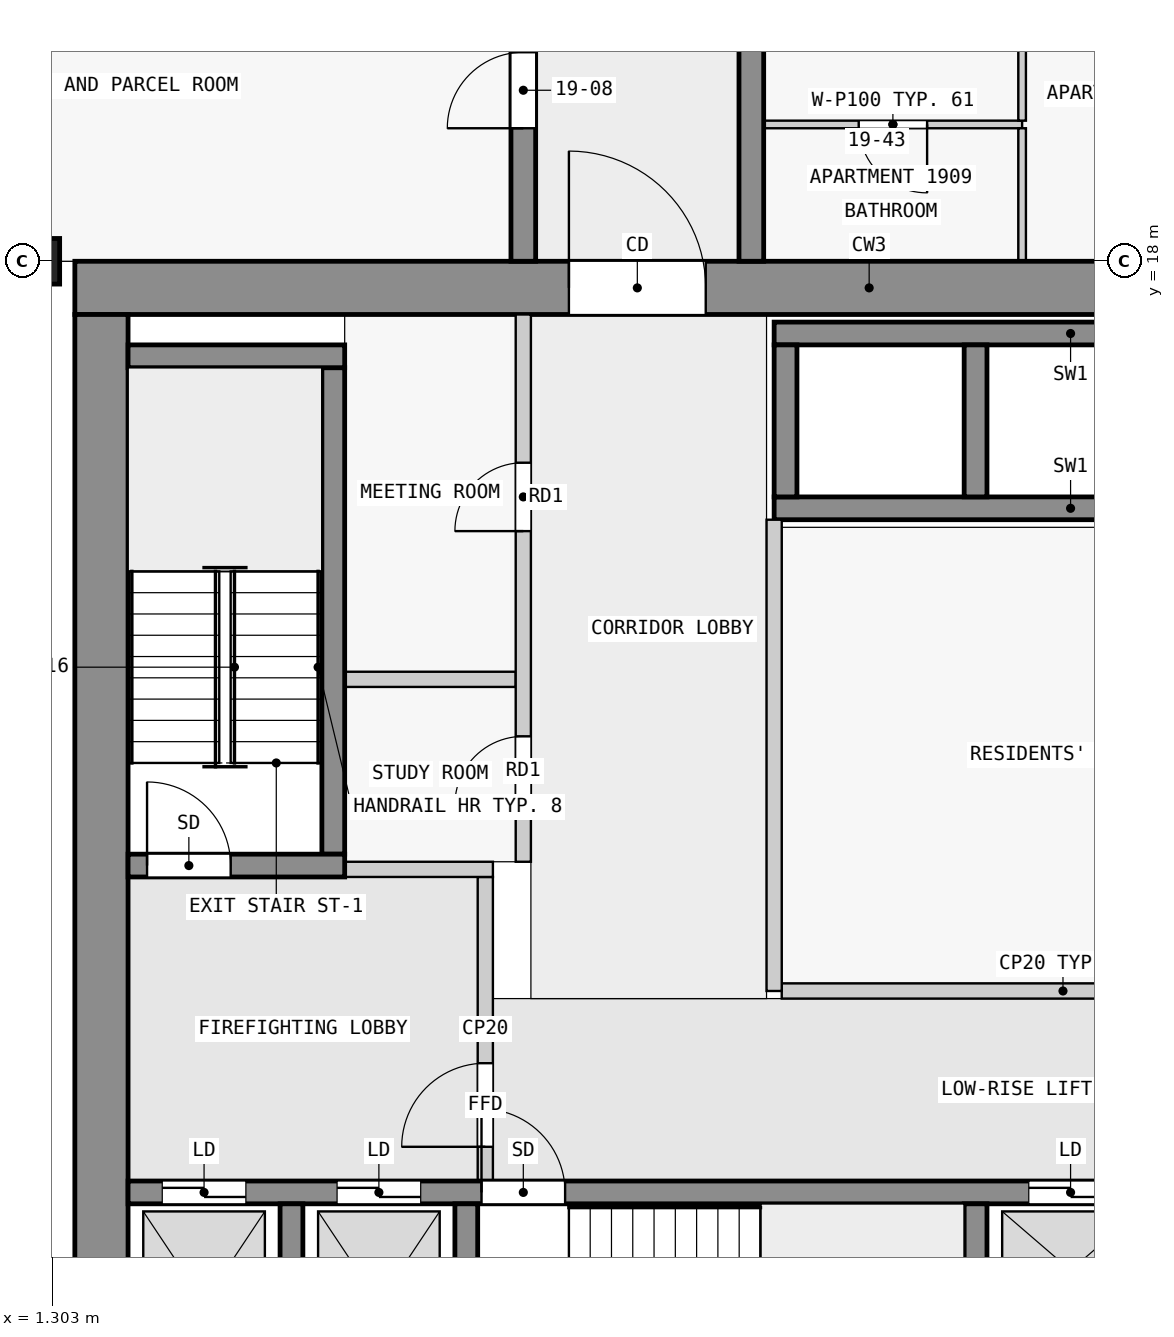
"""IFC4 building model, lengths in metres.
Left out: names, types, materials, properties, quantities, classifications, styles, units other than length and angle.
Written with IfcOpenShell. Run it as: python <this file> out.ifc"""

import sys

from ifc_helpers import new_model, si_unit, direction, frame, frame_2d, origin, origin_2d, place, context, subcontext, project, spatial, rectangle, extrude, element, fill, save


model = new_model("IFC4")
c1 = context("Model", 3, precision=1e-05, world=origin(), true_north=direction((0.0, 1.0)))
c2 = subcontext(c1, "Body", "Model", "MODEL_VIEW")
j1 = project(units=[si_unit("LENGTHUNIT", "METRE"), si_unit("PLANEANGLEUNIT", "RADIAN")], contexts=[c1])
p1 = place(None, origin())
s1 = spatial("IfcSite", under=j1, at=p1, CompositionType="ELEMENT")
p2 = place(p1, origin())
s2 = spatial("IfcBuilding", under=s1, at=p2, CompositionType="ELEMENT")
p3 = place(p2, frame((0.0, 0.0, 78.3)))
s3 = spatial("IfcBuildingStorey", under=s2, at=p3, CompositionType="ELEMENT", Elevation=78.3)
p4 = place(p3, frame((0.7, 18.0, 0.0), z_axis=(0.0, 0.0, 1.0), x_axis=(0.0, 1.0, 0.0)))
e1 = element("IfcColumn", 1, at=p4, inside=s3, PredefinedType="COLUMN", context=c2, shape_type="SweptSolid", body=[
    extrude(rectangle(XDim=0.6, YDim=1.4, at=origin_2d()), origin(), (0.0, 0.0, 1.0), 3.5),
])
p5 = place(p3, frame((1.6, 17.65, 0.0), z_axis=(0.0, 0.0, 1.0), x_axis=(1.0, 0.0, 0.0)))
e2 = element("IfcWall", 2, at=p5, inside=s3, PredefinedType="SHEAR", context=c2, shape_type="SweptSolid", body=[
    extrude(rectangle(XDim=20.9, YDim=0.7, at=frame_2d((10.45, 0.0))), origin(), (0.0, 0.0, 1.0), 3.25),
])
p6 = place(p5, frame((6.5, 0.0, 0.0)))
e3 = element("IfcOpeningElement", 3, at=p6, cuts=e2, PredefinedType="OPENING", context=c2, shape_type="SweptSolid", body=[
    extrude(rectangle(XDim=1.8, YDim=2.1, at=frame_2d((0.9, 1.05))), frame((0.0, 0.36, 0.0), z_axis=(0.0, -1.0, 0.0), x_axis=(1.0, 0.0, 0.0)), (0.0, 0.0, 1.0), 0.72),
])
p7 = place(p3, frame((1.95, 2.5, 0.0), z_axis=(0.0, 0.0, 1.0), x_axis=(0.0, 1.0, 0.0)))
e4 = element("IfcWall", 4, at=p7, inside=s3, PredefinedType="SHEAR", context=c2, shape_type="SweptSolid", body=[
    extrude(rectangle(XDim=14.8, YDim=0.7, at=frame_2d((7.4, 0.0))), origin(), (0.0, 0.0, 1.0), 3.25),
])
for number, where, z_axis, x_axis in (
    (5, (4.45, 2.8, 0.0), (0.0, 0.0, 1.0), (0.0, 1.0, 0.0)),
    (6, (6.75, 2.8, 0.0), (0.0, 0.0, 1.0), (0.0, 1.0, 0.0)),
    (7, (13.45, 2.8, 0.0), (0.0, 0.0, 1.0), (0.0, 1.0, 0.0)),
):
    element("IfcWall", number, at=place(p3, frame(where, z_axis=z_axis, x_axis=x_axis)), inside=s3, PredefinedType="SHEAR", context=c2, shape_type="SweptSolid", body=[
        extrude(rectangle(XDim=2.8, YDim=0.3, at=frame_2d((1.4, 0.0))), origin(), (0.0, 0.0, 1.0), 3.25),
    ])
p8 = place(p3, frame((2.3, 5.75, 0.0), z_axis=(0.0, 0.0, 1.0), x_axis=(1.0, 0.0, 0.0)))
e8 = element("IfcWall", 8, at=p8, inside=s3, PredefinedType="SHEAR", context=c2, shape_type="SweptSolid", body=[
    extrude(rectangle(XDim=18.8, YDim=0.3, at=frame_2d((9.4, 0.0))), origin(), (0.0, 0.0, 1.0), 3.25),
])
p9 = place(p8, frame((4.65, 0.0, 0.0)))
e9 = element("IfcOpeningElement", 9, at=p9, cuts=e8, PredefinedType="OPENING", context=c2, shape_type="SweptSolid", body=[
    extrude(rectangle(XDim=1.1, YDim=2.1, at=frame_2d((0.55, 1.05))), frame((0.0, 0.16, 0.0), z_axis=(0.0, -1.0, 0.0), x_axis=(1.0, 0.0, 0.0)), (0.0, 0.0, 1.0), 0.32),
])
p10 = place(p8, frame((0.45, 0.0, 0.0)))
e10 = element("IfcOpeningElement", 10, at=p10, cuts=e8, PredefinedType="OPENING", context=c2, shape_type="SweptSolid", body=[
    extrude(rectangle(XDim=1.1, YDim=2.1, at=frame_2d((0.55, 1.05))), frame((0.0, 0.16, 0.0), z_axis=(0.0, -1.0, 0.0), x_axis=(1.0, 0.0, 0.0)), (0.0, 0.0, 1.0), 0.32),
])
p11 = place(p8, frame((2.75, 0.0, 0.0)))
e11 = element("IfcOpeningElement", 11, at=p11, cuts=e8, PredefinedType="OPENING", context=c2, shape_type="SweptSolid", body=[
    extrude(rectangle(XDim=1.1, YDim=2.1, at=frame_2d((0.55, 1.05))), frame((0.0, 0.16, 0.0), z_axis=(0.0, -1.0, 0.0), x_axis=(1.0, 0.0, 0.0)), (0.0, 0.0, 1.0), 0.32),
])
p12 = place(p8, frame((11.85, 0.0, 0.0)))
e12 = element("IfcOpeningElement", 12, at=p12, cuts=e8, PredefinedType="OPENING", context=c2, shape_type="SweptSolid", body=[
    extrude(rectangle(XDim=1.1, YDim=2.1, at=frame_2d((0.55, 1.05))), frame((0.0, 0.16, 0.0), z_axis=(0.0, -1.0, 0.0), x_axis=(1.0, 0.0, 0.0)), (0.0, 0.0, 1.0), 0.32),
])
p13 = place(p8, frame((14.35, 0.0, 0.0)))
e13 = element("IfcOpeningElement", 13, at=p13, cuts=e8, PredefinedType="OPENING", context=c2, shape_type="SweptSolid", body=[
    extrude(rectangle(XDim=1.1, YDim=2.1, at=frame_2d((0.55, 1.05))), frame((0.0, 0.16, 0.0), z_axis=(0.0, -1.0, 0.0), x_axis=(1.0, 0.0, 0.0)), (0.0, 0.0, 1.0), 0.32),
])
p14 = place(p8, frame((16.85, 0.0, 0.0)))
e14 = element("IfcOpeningElement", 14, at=p14, cuts=e8, PredefinedType="OPENING", context=c2, shape_type="SweptSolid", body=[
    extrude(rectangle(XDim=1.1, YDim=2.1, at=frame_2d((0.55, 1.05))), frame((0.0, 0.16, 0.0), z_axis=(0.0, -1.0, 0.0), x_axis=(1.0, 0.0, 0.0)), (0.0, 0.0, 1.0), 0.32),
])
p15 = place(p3, frame((2.3, 10.05, 0.0), z_axis=(0.0, 0.0, 1.0), x_axis=(1.0, 0.0, 0.0)))
e15 = element("IfcWall", 15, at=p15, inside=s3, PredefinedType="SHEAR", context=c2, shape_type="SweptSolid", body=[
    extrude(rectangle(XDim=2.85, YDim=0.3, at=frame_2d((1.425, 0.0))), origin(), (0.0, 0.0, 1.0), 3.25),
])
p16 = place(p15, frame((0.25, 0.0, 0.0)))
e16 = element("IfcOpeningElement", 16, at=p16, cuts=e15, PredefinedType="OPENING", context=c2, shape_type="SweptSolid", body=[
    extrude(rectangle(XDim=1.1, YDim=2.1, at=frame_2d((0.55, 1.05))), frame((0.0, 0.16, 0.0), z_axis=(0.0, -1.0, 0.0), x_axis=(1.0, 0.0, 0.0)), (0.0, 0.0, 1.0), 0.32),
])
p17 = place(p3, frame((5.0, 10.2, 0.0), z_axis=(0.0, 0.0, 1.0), x_axis=(0.0, 1.0, 0.0)))
e17 = element("IfcWall", 17, at=p17, inside=s3, PredefinedType="SHEAR", context=c2, shape_type="SweptSolid", body=[
    extrude(rectangle(XDim=6.4, YDim=0.3, at=frame_2d((3.2, 0.0))), origin(), (0.0, 0.0, 1.0), 3.25),
])
p18 = place(p3, frame((2.3, 16.75, 0.0), z_axis=(0.0, 0.0, 1.0), x_axis=(1.0, 0.0, 0.0)))
e18 = element("IfcWall", 18, at=p18, inside=s3, PredefinedType="SHEAR", context=c2, shape_type="SweptSolid", body=[
    extrude(rectangle(XDim=2.85, YDim=0.3, at=frame_2d((1.425, 0.0))), origin(), (0.0, 0.0, 1.0), 3.25),
])
for number, where, z_axis, x_axis in (
    (19, (10.8, 17.05, 0.0), (0.0, 0.0, 1.0), (1.0, 0.0, 0.0)),
    (20, (10.8, 14.75, 0.0), (0.0, 0.0, 1.0), (1.0, 0.0, 0.0)),
):
    element("IfcWall", number, at=place(p3, frame(where, z_axis=z_axis, x_axis=x_axis)), inside=s3, PredefinedType="SHEAR", context=c2, shape_type="SweptSolid", body=[
        extrude(rectangle(XDim=7.8, YDim=0.3, at=frame_2d((3.9, 0.0))), origin(), (0.0, 0.0, 1.0), 3.25),
    ])
for number, where, z_axis, x_axis in (
    (21, (10.95, 14.9, 0.0), (0.0, 0.0, 1.0), (0.0, 1.0, 0.0)),
    (22, (13.45, 14.9, 0.0), (0.0, 0.0, 1.0), (0.0, 1.0, 0.0)),
):
    element("IfcWall", number, at=place(p3, frame(where, z_axis=z_axis, x_axis=x_axis)), inside=s3, PredefinedType="SHEAR", context=c2, shape_type="SweptSolid", body=[
        extrude(rectangle(XDim=2.0, YDim=0.3, at=frame_2d((1.0, 0.0))), origin(), (0.0, 0.0, 1.0), 3.25),
    ])
p19 = place(p3, frame((7.5, 18.0, 0.0), z_axis=(0.0, 0.0, 1.0), x_axis=(0.0, 1.0, 0.0)))
e23 = element("IfcWall", 23, at=p19, inside=s3, PredefinedType="SHEAR", context=c2, shape_type="SweptSolid", body=[
    extrude(rectangle(XDim=27.0, YDim=0.325, at=frame_2d((13.5, 0.0))), origin(), (0.0, 0.0, 1.0), 3.25),
])
p20 = place(p19, frame((1.75, 0.0, 0.0)))
e24 = element("IfcOpeningElement", 24, at=p20, cuts=e23, PredefinedType="OPENING", context=c2, shape_type="SweptSolid", body=[
    extrude(rectangle(XDim=1.0, YDim=2.1, at=frame_2d((0.5, 1.05))), frame((0.0, 0.172, 0.0), z_axis=(0.0, -1.0, 0.0), x_axis=(1.0, 0.0, 0.0)), (0.0, 0.0, 1.0), 0.345),
])
p21 = place(p19, frame((6.25, 0.0, 0.0)))
e25 = element("IfcOpeningElement", 25, at=p21, cuts=e23, PredefinedType="OPENING", context=c2, shape_type="SweptSolid", body=[
    extrude(rectangle(XDim=1.0, YDim=2.1, at=frame_2d((0.5, 1.05))), frame((0.0, 0.172, 0.0), z_axis=(0.0, -1.0, 0.0), x_axis=(1.0, 0.0, 0.0)), (0.0, 0.0, 1.0), 0.345),
])
p22 = place(p19, frame((10.75, 0.0, 0.0)))
e26 = element("IfcOpeningElement", 26, at=p22, cuts=e23, PredefinedType="OPENING", context=c2, shape_type="SweptSolid", body=[
    extrude(rectangle(XDim=1.0, YDim=2.1, at=frame_2d((0.5, 1.05))), frame((0.0, 0.172, 0.0), z_axis=(0.0, -1.0, 0.0), x_axis=(1.0, 0.0, 0.0)), (0.0, 0.0, 1.0), 0.345),
])
p23 = place(p19, frame((15.25, 0.0, 0.0)))
e27 = element("IfcOpeningElement", 27, at=p23, cuts=e23, PredefinedType="OPENING", context=c2, shape_type="SweptSolid", body=[
    extrude(rectangle(XDim=1.0, YDim=2.1, at=frame_2d((0.5, 1.05))), frame((0.0, 0.172, 0.0), z_axis=(0.0, -1.0, 0.0), x_axis=(1.0, 0.0, 0.0)), (0.0, 0.0, 1.0), 0.345),
])
p24 = place(p19, frame((21.35, 0.0, 0.0)))
e28 = element("IfcOpeningElement", 28, at=p24, cuts=e23, PredefinedType="OPENING", context=c2, shape_type="SweptSolid", body=[
    extrude(rectangle(XDim=1.0, YDim=2.1, at=frame_2d((0.5, 1.05))), frame((0.0, 0.172, 0.0), z_axis=(0.0, -1.0, 0.0), x_axis=(1.0, 0.0, 0.0)), (0.0, 0.0, 1.0), 0.345),
])
p25 = place(p3, frame((10.5, 18.0, 0.0), z_axis=(0.0, 0.0, 1.0), x_axis=(0.0, 1.0, 0.0)))
e29 = element("IfcWall", 29, at=p25, inside=s3, PredefinedType="SHEAR", context=c2, shape_type="SweptSolid", body=[
    extrude(rectangle(XDim=27.0, YDim=0.325, at=frame_2d((13.5, 0.0))), origin(), (0.0, 0.0, 1.0), 3.25),
])
p26 = place(p25, frame((4.05, 0.0, 0.0)))
e30 = element("IfcOpeningElement", 30, at=p26, cuts=e29, PredefinedType="OPENING", context=c2, shape_type="SweptSolid", body=[
    extrude(rectangle(XDim=1.0, YDim=2.1, at=frame_2d((0.5, 1.05))), frame((0.0, 0.172, 0.0), z_axis=(0.0, -1.0, 0.0), x_axis=(1.0, 0.0, 0.0)), (0.0, 0.0, 1.0), 0.345),
])
p27 = place(p25, frame((13.05, 0.0, 0.0)))
e31 = element("IfcOpeningElement", 31, at=p27, cuts=e29, PredefinedType="OPENING", context=c2, shape_type="SweptSolid", body=[
    extrude(rectangle(XDim=1.0, YDim=2.1, at=frame_2d((0.5, 1.05))), frame((0.0, 0.172, 0.0), z_axis=(0.0, -1.0, 0.0), x_axis=(1.0, 0.0, 0.0)), (0.0, 0.0, 1.0), 0.345),
])
p28 = place(p25, frame((19.75, 0.0, 0.0)))
e32 = element("IfcOpeningElement", 32, at=p28, cuts=e29, PredefinedType="OPENING", context=c2, shape_type="SweptSolid", body=[
    extrude(rectangle(XDim=1.0, YDim=2.1, at=frame_2d((0.5, 1.05))), frame((0.0, 0.172, 0.0), z_axis=(0.0, -1.0, 0.0), x_axis=(1.0, 0.0, 0.0)), (0.0, 0.0, 1.0), 0.345),
])
p29 = place(p25, frame((23.25, 0.0, 0.0)))
e33 = element("IfcOpeningElement", 33, at=p29, cuts=e29, PredefinedType="OPENING", context=c2, shape_type="SweptSolid", body=[
    extrude(rectangle(XDim=0.9, YDim=2.1, at=frame_2d((0.45, 1.05))), frame((0.0, 0.172, 0.0), z_axis=(0.0, -1.0, 0.0), x_axis=(1.0, 0.0, 0.0)), (0.0, 0.0, 1.0), 0.345),
])
p30 = place(p25, frame((25.45, 0.0, 0.0)))
e34 = element("IfcOpeningElement", 34, at=p30, cuts=e29, PredefinedType="OPENING", context=c2, shape_type="SweptSolid", body=[
    extrude(rectangle(XDim=1.0, YDim=2.1, at=frame_2d((0.5, 1.05))), frame((0.0, 0.172, 0.0), z_axis=(0.0, -1.0, 0.0), x_axis=(1.0, 0.0, 0.0)), (0.0, 0.0, 1.0), 0.345),
])
p31 = place(p3, frame((7.0, 5.9, 0.0), z_axis=(0.0, 0.0, 1.0), x_axis=(0.0, 1.0, 0.0)))
e35 = element("IfcWall", 35, at=p31, inside=s3, PredefinedType="PARTITIONING", context=c2, shape_type="SweptSolid", body=[
    extrude(rectangle(XDim=4.0, YDim=0.2, at=frame_2d((2.0, 0.0))), origin(), (0.0, 0.0, 1.0), 3.25),
])
p32 = place(p31, frame((0.45, 0.0, 0.0)))
e36 = element("IfcOpeningElement", 36, at=p32, cuts=e35, PredefinedType="OPENING", context=c2, shape_type="SweptSolid", body=[
    extrude(rectangle(XDim=1.1, YDim=2.1, at=frame_2d((0.55, 1.05))), frame((0.0, 0.11, 0.0), z_axis=(0.0, -1.0, 0.0), x_axis=(1.0, 0.0, 0.0)), (0.0, 0.0, 1.0), 0.22),
])
p33 = place(p3, frame((5.15, 10.0, 0.0), z_axis=(0.0, 0.0, 1.0), x_axis=(1.0, 0.0, 0.0)))
e37 = element("IfcWall", 37, at=p33, inside=s3, PredefinedType="PARTITIONING", context=c2, shape_type="SweptSolid", body=[
    extrude(rectangle(XDim=1.95, YDim=0.2, at=frame_2d((0.975, 0.0))), origin(), (0.0, 0.0, 1.0), 3.25),
])
p34 = place(p3, frame((10.8, 8.4, 0.0), z_axis=(0.0, 0.0, 1.0), x_axis=(0.0, 1.0, 0.0)))
e38 = element("IfcWall", 38, at=p34, inside=s3, PredefinedType="PARTITIONING", context=c2, shape_type="SweptSolid", body=[
    extrude(rectangle(XDim=6.2, YDim=0.2, at=frame_2d((3.1, 0.0))), origin(), (0.0, 0.0, 1.0), 3.25),
])
p35 = place(p3, frame((10.9, 8.4, 0.0), z_axis=(0.0, 0.0, 1.0), x_axis=(1.0, 0.0, 0.0)))
e39 = element("IfcWall", 39, at=p35, inside=s3, PredefinedType="PARTITIONING", context=c2, shape_type="SweptSolid", body=[
    extrude(rectangle(XDim=7.4, YDim=0.2, at=frame_2d((3.7, 0.0))), origin(), (0.0, 0.0, 1.0), 3.25),
])
p36 = place(p3, frame((7.5, 10.1, 0.0), z_axis=(0.0, 0.0, 1.0), x_axis=(0.0, 1.0, 0.0)))
e40 = element("IfcWall", 40, at=p36, inside=s3, PredefinedType="PARTITIONING", context=c2, shape_type="SweptSolid", body=[
    extrude(rectangle(XDim=7.2, YDim=0.2, at=frame_2d((3.6, 0.0))), origin(), (0.0, 0.0, 1.0), 3.25),
])
p37 = place(p36, frame((0.75, 0.0, 0.0)))
e41 = element("IfcOpeningElement", 41, at=p37, cuts=e40, PredefinedType="OPENING", context=c2, shape_type="SweptSolid", body=[
    extrude(rectangle(XDim=0.9, YDim=2.1, at=frame_2d((0.45, 1.05))), frame((0.0, 0.11, 0.0), z_axis=(0.0, -1.0, 0.0), x_axis=(1.0, 0.0, 0.0)), (0.0, 0.0, 1.0), 0.22),
])
p38 = place(p36, frame((4.35, 0.0, 0.0)))
e42 = element("IfcOpeningElement", 42, at=p38, cuts=e40, PredefinedType="OPENING", context=c2, shape_type="SweptSolid", body=[
    extrude(rectangle(XDim=0.9, YDim=2.1, at=frame_2d((0.45, 1.05))), frame((0.0, 0.11, 0.0), z_axis=(0.0, -1.0, 0.0), x_axis=(1.0, 0.0, 0.0)), (0.0, 0.0, 1.0), 0.22),
])
p39 = place(p3, frame((5.15, 12.5, 0.0), z_axis=(0.0, 0.0, 1.0), x_axis=(1.0, 0.0, 0.0)))
e43 = element("IfcWall", 43, at=p39, inside=s3, PredefinedType="PARTITIONING", context=c2, shape_type="SweptSolid", body=[
    extrude(rectangle(XDim=2.25, YDim=0.2, at=frame_2d((1.125, 0.0))), origin(), (0.0, 0.0, 1.0), 3.25),
])
p40 = place(p3, frame((14.062, 19.8, 0.0), z_axis=(0.0, 0.0, 1.0), x_axis=(-1.0, 0.0, 0.0)))
e44 = element("IfcWall", 44, at=p40, inside=s3, PredefinedType="PARTITIONING", context=c2, shape_type="SweptSolid", body=[
    extrude(rectangle(XDim=3.4, YDim=0.1, at=frame_2d((1.7, 0.0))), origin(), (0.0, 0.0, 1.0), 3.25),
])
p41 = place(p40, frame((1.25, 0.0, 0.0)))
e45 = element("IfcOpeningElement", 45, at=p41, cuts=e44, PredefinedType="OPENING", context=c2, shape_type="SweptSolid", body=[
    extrude(rectangle(XDim=0.9, YDim=2.1, at=frame_2d((0.45, 1.05))), frame((0.0, 0.06, 0.0), z_axis=(0.0, -1.0, 0.0), x_axis=(1.0, 0.0, 0.0)), (0.0, 0.0, 1.0), 0.12),
])
p42 = place(p3, frame((14.062, 22.45, 0.0), z_axis=(0.0, 0.0, 1.0), x_axis=(0.0, -1.0, 0.0)))
e46 = element("IfcWall", 46, at=p42, inside=s3, PredefinedType="PARTITIONING", context=c2, shape_type="SweptSolid", body=[
    extrude(rectangle(XDim=2.6, YDim=0.1, at=frame_2d((1.3, 0.0))), origin(), (0.0, 0.0, 1.0), 3.25),
])
p43 = place(p3, frame((14.062, 18.0, 0.0), z_axis=(0.0, 0.0, 1.0), x_axis=(0.0, 1.0, 0.0)))
e47 = element("IfcWall", 47, at=p43, inside=s3, PredefinedType="PARTITIONING", context=c2, shape_type="SweptSolid", body=[
    extrude(rectangle(XDim=1.75, YDim=0.1, at=frame_2d((0.875, 0.0))), origin(), (0.0, 0.0, 1.0), 3.25),
])
p44 = place(p32, origin())
e48 = element("IfcDoor", 48, at=p44, inside=s3, OperationType="SINGLE_SWING_LEFT", PredefinedType="DOOR", context=c2, shape_type="SweptSolid", body=[
    extrude(rectangle(XDim=1.1, YDim=2.1, at=frame_2d((0.55, 1.05))), frame((0.0, 0.025, 0.0), z_axis=(0.0, -1.0, 0.0), x_axis=(1.0, 0.0, 0.0)), (0.0, 0.0, 1.0), 0.05),
])
fill(e36, e48)
p45 = place(p16, origin())
e49 = element("IfcDoor", 49, at=p45, inside=s3, OperationType="SINGLE_SWING_RIGHT", PredefinedType="DOOR", context=c2, shape_type="SweptSolid", body=[
    extrude(rectangle(XDim=1.1, YDim=2.1, at=frame_2d((0.55, 1.05))), frame((0.0, 0.025, 0.0), z_axis=(0.0, -1.0, 0.0), x_axis=(1.0, 0.0, 0.0)), (0.0, 0.0, 1.0), 0.05),
])
fill(e16, e49)
p46 = place(p9, origin())
e50 = element("IfcDoor", 50, at=p46, inside=s3, OperationType="SINGLE_SWING_LEFT", PredefinedType="DOOR", context=c2, shape_type="SweptSolid", body=[
    extrude(rectangle(XDim=1.1, YDim=2.1, at=frame_2d((0.55, 1.05))), frame((0.0, 0.025, 0.0), z_axis=(0.0, -1.0, 0.0), x_axis=(1.0, 0.0, 0.0)), (0.0, 0.0, 1.0), 0.05),
])
fill(e9, e50)
p47 = place(p10, origin())
e51 = element("IfcDoor", 51, at=p47, inside=s3, OperationType="DOUBLE_DOOR_SLIDING", PredefinedType="DOOR", context=c2, shape_type="SweptSolid", body=[
    extrude(rectangle(XDim=1.1, YDim=2.1, at=frame_2d((0.55, 1.05))), frame((0.0, 0.025, 0.0), z_axis=(0.0, -1.0, 0.0), x_axis=(1.0, 0.0, 0.0)), (0.0, 0.0, 1.0), 0.05),
])
fill(e10, e51)
p48 = place(p11, origin())
e52 = element("IfcDoor", 52, at=p48, inside=s3, OperationType="DOUBLE_DOOR_SLIDING", PredefinedType="DOOR", context=c2, shape_type="SweptSolid", body=[
    extrude(rectangle(XDim=1.1, YDim=2.1, at=frame_2d((0.55, 1.05))), frame((0.0, 0.025, 0.0), z_axis=(0.0, -1.0, 0.0), x_axis=(1.0, 0.0, 0.0)), (0.0, 0.0, 1.0), 0.05),
])
fill(e11, e52)
p49 = place(p12, origin())
e53 = element("IfcDoor", 53, at=p49, inside=s3, OperationType="DOUBLE_DOOR_SLIDING", PredefinedType="DOOR", context=c2, shape_type="SweptSolid", body=[
    extrude(rectangle(XDim=1.1, YDim=2.1, at=frame_2d((0.55, 1.05))), frame((0.0, 0.025, 0.0), z_axis=(0.0, -1.0, 0.0), x_axis=(1.0, 0.0, 0.0)), (0.0, 0.0, 1.0), 0.05),
])
fill(e12, e53)
p50 = place(p6, origin())
e54 = element("IfcDoor", 54, at=p50, inside=s3, OperationType="DOUBLE_DOOR_SINGLE_SWING", PredefinedType="DOOR", context=c2, shape_type="SweptSolid", body=[
    extrude(rectangle(XDim=1.8, YDim=2.1, at=frame_2d((0.9, 1.05))), frame((0.0, 0.025, 0.0), z_axis=(0.0, -1.0, 0.0), x_axis=(1.0, 0.0, 0.0)), (0.0, 0.0, 1.0), 0.05),
])
fill(e3, e54)
p51 = place(p37, origin())
e55 = element("IfcDoor", 55, at=p51, inside=s3, OperationType="SINGLE_SWING_RIGHT", PredefinedType="DOOR", context=c2, shape_type="SweptSolid", body=[
    extrude(rectangle(XDim=0.9, YDim=2.1, at=frame_2d((0.45, 1.05))), frame((0.0, 0.025, 0.0), z_axis=(0.0, -1.0, 0.0), x_axis=(1.0, 0.0, 0.0)), (0.0, 0.0, 1.0), 0.05),
])
fill(e41, e55)
p52 = place(p38, origin())
e56 = element("IfcDoor", 56, at=p52, inside=s3, OperationType="SINGLE_SWING_RIGHT", PredefinedType="DOOR", context=c2, shape_type="SweptSolid", body=[
    extrude(rectangle(XDim=0.9, YDim=2.1, at=frame_2d((0.45, 1.05))), frame((0.0, 0.025, 0.0), z_axis=(0.0, -1.0, 0.0), x_axis=(1.0, 0.0, 0.0)), (0.0, 0.0, 1.0), 0.05),
])
fill(e42, e56)
p53 = place(p20, origin())
e57 = element("IfcDoor", 57, at=p53, inside=s3, OperationType="SINGLE_SWING_LEFT", PredefinedType="DOOR", context=c2, shape_type="SweptSolid", body=[
    extrude(rectangle(XDim=1.0, YDim=2.1, at=frame_2d((0.5, 1.05))), frame((0.0, 0.025, 0.0), z_axis=(0.0, -1.0, 0.0), x_axis=(1.0, 0.0, 0.0)), (0.0, 0.0, 1.0), 0.05),
])
fill(e24, e57)
p54 = place(p41, origin())
e58 = element("IfcDoor", 58, at=p54, inside=s3, OperationType="SINGLE_SWING_LEFT", PredefinedType="DOOR", context=c2, shape_type="SweptSolid", body=[
    extrude(rectangle(XDim=0.9, YDim=2.1, at=frame_2d((0.45, 1.05))), frame((0.0, 0.025, 0.0), z_axis=(0.0, -1.0, 0.0), x_axis=(1.0, 0.0, 0.0)), (0.0, 0.0, 1.0), 0.05),
])
fill(e45, e58)
save(model, sys.argv[1])
